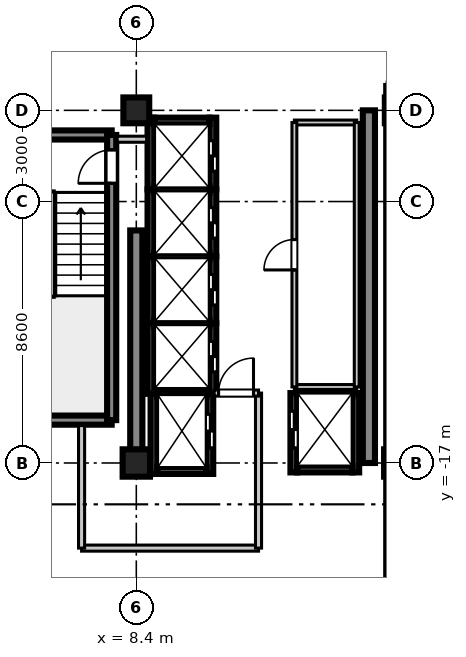
"""IFC4 building model, lengths in metres.
Left out: names, types, materials, properties, quantities, classifications, styles, units other than length and angle.
Written with IfcOpenShell. Run it as: python <this file> out.ifc"""

import sys

from ifc_helpers import new_model, si_unit, direction, frame, frame_2d, origin, origin_2d, place, context, subcontext, project, spatial, rectangle, extrude, source, transform, mapped, element, fill, save


model = new_model("IFC4")
c1 = context("Model", 3, precision=1e-05, world=origin(), true_north=direction((0.0, 1.0)))
c2 = subcontext(c1, "Body", "Model", "MODEL_VIEW")
j1 = project(units=[si_unit("LENGTHUNIT", "METRE"), si_unit("PLANEANGLEUNIT", "RADIAN")], contexts=[c1])
p1 = place(None, origin())
s1 = spatial("IfcSite", under=j1, at=p1, CompositionType="ELEMENT")
p2 = place(p1, origin())
s2 = spatial("IfcBuilding", under=s1, at=p2, CompositionType="ELEMENT")
p3 = place(p2, frame((0.0, 0.0, 273.8)))
s3 = spatial("IfcBuildingStorey", under=s2, at=p3, CompositionType="ELEMENT", Elevation=273.8)
m1 = source(origin(), c2, "Body", "SweptSolid", [
    extrude(rectangle(XDim=0.9, YDim=0.9, at=origin_2d()), origin(), (0.0, 0.0, 1.0), 3.705),
])
p4 = place(p3, frame((8.4, -17.0, 0.0), z_axis=(0.0, 0.0, 1.0), x_axis=(1.0, 0.0, 0.0)))
e1 = element("IfcColumn", 1, at=p4, inside=s3, PredefinedType="COLUMN", context=c2, shape_type="MappedRepresentation", body=[
    mapped(m1, transform((0.0, 0.0, 0.0), scale=1.0)),
])
m2 = source(origin(), c2, "Body", "SweptSolid", [
    extrude(rectangle(XDim=0.85, YDim=0.85, at=origin_2d()), origin(), (0.0, 0.0, 1.0), 3.705),
])
p5 = place(p3, frame((8.4, -5.4, 0.0), z_axis=(0.0, 0.0, 1.0), x_axis=(1.0, 0.0, 0.0)))
e2 = element("IfcColumn", 2, at=p5, inside=s3, PredefinedType="PILASTER", context=c2, shape_type="MappedRepresentation", body=[
    mapped(m2, transform((0.0, 0.0, 0.0), scale=1.0)),
])
p6 = place(p3, frame((17.0, -17.0, 0.0), z_axis=(0.0, 0.0, 1.0), x_axis=(1.0, 0.0, 0.0)))
e3 = element("IfcColumn", 3, at=p6, inside=s3, PredefinedType="COLUMN", context=c2, shape_type="MappedRepresentation", body=[
    mapped(m1, transform((0.0, 0.0, 0.0), scale=1.0)),
])
p7 = place(p3, frame((17.0, -5.4, 0.0), z_axis=(0.0, 0.0, 1.0), x_axis=(1.0, 0.0, 0.0)))
e4 = element("IfcColumn", 4, at=p7, inside=s3, PredefinedType="PILASTER", context=c2, shape_type="MappedRepresentation", body=[
    mapped(m2, transform((0.0, 0.0, 0.0), scale=1.0)),
])
m3 = source(origin(), c2, "Body", "SweptSolid", [
    extrude(rectangle(XDim=7.65, YDim=0.4, at=frame_2d((3.825, 0.0))), origin(), (0.0, 0.0, 1.0), 3.45),
])
p8 = place(p3, frame((8.4, -17.0, 0.0), z_axis=(0.0, 0.0, 1.0), x_axis=(0.0, 1.0, 0.0)))
e5 = element("IfcWall", 5, at=p8, inside=s3, PredefinedType="SHEAR", context=c2, shape_type="MappedRepresentation", body=[
    mapped(m3, transform((0.0, 0.0, 0.0), scale=1.0)),
])
m4 = source(origin(), c2, "Body", "SweptSolid", [
    extrude(rectangle(XDim=11.6, YDim=0.4, at=frame_2d((5.8, 0.0))), origin(), (0.0, 0.0, 1.0), 3.45),
])
p9 = place(p3, frame((16.05, -17.0, 0.0), z_axis=(0.0, 0.0, 1.0), x_axis=(0.0, 1.0, 0.0)))
e6 = element("IfcWall", 6, at=p9, inside=s3, PredefinedType="SHEAR", context=c2, shape_type="MappedRepresentation", body=[
    mapped(m4, transform((0.0, 0.0, 0.0), scale=1.0)),
])
m5 = source(origin(), c2, "Body", "SweptSolid", [
    extrude(rectangle(XDim=3.98, YDim=0.3, at=frame_2d((1.99, 0.0))), origin(), (0.0, 0.0, 1.0), 3.45),
])
for number, where, z_axis, x_axis in (
    (7, (3.61, -15.59, 0.0), (0.0, 0.0, 1.0), (1.0, 0.0, 0.0)),
    (8, (3.61, -6.21, 0.0), (0.0, 0.0, 1.0), (1.0, 0.0, 0.0)),
):
    element("IfcWall", number, at=place(p3, frame(where, z_axis=z_axis, x_axis=x_axis)), inside=s3, PredefinedType="SHEAR", context=c2, shape_type="MappedRepresentation", body=[
        mapped(m5, transform((0.0, 0.0, 0.0), scale=1.0)),
    ])
m6 = source(origin(), c2, "Body", "SweptSolid", [
    extrude(rectangle(XDim=9.38, YDim=0.3, at=frame_2d((4.69, 0.0))), origin(), (0.0, 0.0, 1.0), 3.45),
])
p10 = place(p3, frame((7.59, -15.59, 0.0), z_axis=(0.0, 0.0, 1.0), x_axis=(0.0, 1.0, 0.0)))
e9 = element("IfcWall", 9, at=p10, inside=s3, PredefinedType="SHEAR", context=c2, shape_type="MappedRepresentation", body=[
    mapped(m6, transform((0.0, 0.0, 0.0), scale=1.0)),
])
p11 = place(p10, frame((7.79, 0.0, 0.0)))
e10 = element("IfcOpeningElement", 10, at=p11, cuts=e9, PredefinedType="OPENING", context=c2, shape_type="SweptSolid", body=[
    extrude(rectangle(XDim=1.1, YDim=2.15, at=frame_2d((0.55, 1.075))), frame((0.0, 0.16, 0.0), z_axis=(0.0, -1.0, 0.0), x_axis=(1.0, 0.0, 0.0)), (0.0, 0.0, 1.0), 0.32),
])
m7 = source(origin(), c2, "Body", "SweptSolid", [
    extrude(rectangle(XDim=2.36, YDim=0.22, at=frame_2d((1.18, 0.0))), origin(), (0.0, 0.0, 1.0), 3.45),
])
p12 = place(p3, frame((8.88, -8.0, 0.0), z_axis=(0.0, 0.0, 1.0), x_axis=(0.0, 1.0, 0.0)))
e11 = element("IfcWall", 11, at=p12, inside=s3, PredefinedType="SHEAR", context=c2, shape_type="MappedRepresentation", body=[
    mapped(m7, transform((0.0, 0.0, 0.0), scale=1.0)),
])
p13 = place(p3, frame((10.92, -8.0, 0.0), z_axis=(0.0, 0.0, 1.0), x_axis=(0.0, 1.0, 0.0)))
e12 = element("IfcWall", 12, at=p13, inside=s3, PredefinedType="SHEAR", context=c2, shape_type="MappedRepresentation", body=[
    mapped(m7, transform((0.0, 0.0, 0.0), scale=1.0)),
])
p14 = place(p13, frame((0.6, 0.0, 0.0)))
e13 = element("IfcOpeningElement", 13, at=p14, cuts=e12, PredefinedType="OPENING", context=c2, shape_type="SweptSolid", body=[
    extrude(rectangle(XDim=1.0, YDim=2.2, at=frame_2d((0.5, 1.1))), frame((0.0, 0.12, 0.0), z_axis=(0.0, -1.0, 0.0), x_axis=(1.0, 0.0, 0.0)), (0.0, 0.0, 1.0), 0.24),
])
m8 = source(origin(), c2, "Body", "SweptSolid", [
    extrude(rectangle(XDim=1.82, YDim=0.22, at=frame_2d((0.91, 0.0))), origin(), (0.0, 0.0, 1.0), 3.45),
])
p15 = place(p3, frame((8.99, -5.75, 0.0), z_axis=(0.0, 0.0, 1.0), x_axis=(1.0, 0.0, 0.0)))
e14 = element("IfcWall", 14, at=p15, inside=s3, PredefinedType="SHEAR", context=c2, shape_type="MappedRepresentation", body=[
    mapped(m8, transform((0.0, 0.0, 0.0), scale=1.0)),
])
m9 = source(origin(), c2, "Body", "SweptSolid", [
    extrude(rectangle(XDim=2.2, YDim=0.22, at=frame_2d((1.1, 0.0))), origin(), (0.0, 0.0, 1.0), 3.45),
])
p16 = place(p3, frame((8.88, -10.2, 0.0), z_axis=(0.0, 0.0, 1.0), x_axis=(0.0, 1.0, 0.0)))
e15 = element("IfcWall", 15, at=p16, inside=s3, PredefinedType="SHEAR", context=c2, shape_type="MappedRepresentation", body=[
    mapped(m9, transform((0.0, 0.0, 0.0), scale=1.0)),
])
p17 = place(p3, frame((10.92, -10.2, 0.0), z_axis=(0.0, 0.0, 1.0), x_axis=(0.0, 1.0, 0.0)))
e16 = element("IfcWall", 16, at=p17, inside=s3, PredefinedType="SHEAR", context=c2, shape_type="MappedRepresentation", body=[
    mapped(m9, transform((0.0, 0.0, 0.0), scale=1.0)),
])
p18 = place(p17, frame((0.6, 0.0, 0.0)))
e17 = element("IfcOpeningElement", 17, at=p18, cuts=e16, PredefinedType="OPENING", context=c2, shape_type="SweptSolid", body=[
    extrude(rectangle(XDim=1.0, YDim=2.2, at=frame_2d((0.5, 1.1))), frame((0.0, 0.12, 0.0), z_axis=(0.0, -1.0, 0.0), x_axis=(1.0, 0.0, 0.0)), (0.0, 0.0, 1.0), 0.24),
])
m10 = source(origin(), c2, "Body", "SweptSolid", [
    extrude(rectangle(XDim=1.82, YDim=0.22, at=frame_2d((0.91, 0.0))), origin(), (0.0, 0.0, 1.0), 3.75),
])
p19 = place(p3, frame((8.99, -8.0, 0.0), z_axis=(0.0, 0.0, 1.0), x_axis=(1.0, 0.0, 0.0)))
e18 = element("IfcWall", 18, at=p19, inside=s3, PredefinedType="SHEAR", context=c2, shape_type="MappedRepresentation", body=[
    mapped(m10, transform((0.0, 0.0, 0.0), scale=1.0)),
])
p20 = place(p3, frame((8.88, -12.4, 0.0), z_axis=(0.0, 0.0, 1.0), x_axis=(0.0, 1.0, 0.0)))
e19 = element("IfcWall", 19, at=p20, inside=s3, PredefinedType="SHEAR", context=c2, shape_type="MappedRepresentation", body=[
    mapped(m9, transform((0.0, 0.0, 0.0), scale=1.0)),
])
p21 = place(p3, frame((10.92, -12.4, 0.0), z_axis=(0.0, 0.0, 1.0), x_axis=(0.0, 1.0, 0.0)))
e20 = element("IfcWall", 20, at=p21, inside=s3, PredefinedType="SHEAR", context=c2, shape_type="MappedRepresentation", body=[
    mapped(m9, transform((0.0, 0.0, 0.0), scale=1.0)),
])
p22 = place(p21, frame((0.6, 0.0, 0.0)))
e21 = element("IfcOpeningElement", 21, at=p22, cuts=e20, PredefinedType="OPENING", context=c2, shape_type="SweptSolid", body=[
    extrude(rectangle(XDim=1.0, YDim=2.2, at=frame_2d((0.5, 1.1))), frame((0.0, 0.12, 0.0), z_axis=(0.0, -1.0, 0.0), x_axis=(1.0, 0.0, 0.0)), (0.0, 0.0, 1.0), 0.24),
])
p23 = place(p3, frame((8.99, -10.2, 0.0), z_axis=(0.0, 0.0, 1.0), x_axis=(1.0, 0.0, 0.0)))
e22 = element("IfcWall", 22, at=p23, inside=s3, PredefinedType="SHEAR", context=c2, shape_type="MappedRepresentation", body=[
    mapped(m10, transform((0.0, 0.0, 0.0), scale=1.0)),
])
m11 = source(origin(), c2, "Body", "SweptSolid", [
    extrude(rectangle(XDim=2.325, YDim=0.22, at=frame_2d((1.163, 0.0))), origin(), (0.0, 0.0, 1.0), 3.45),
])
p24 = place(p3, frame((8.88, -14.725, 0.0), z_axis=(0.0, 0.0, 1.0), x_axis=(0.0, 1.0, 0.0)))
e23 = element("IfcWall", 23, at=p24, inside=s3, PredefinedType="SHEAR", context=c2, shape_type="MappedRepresentation", body=[
    mapped(m11, transform((0.0, 0.0, 0.0), scale=1.0)),
])
p25 = place(p3, frame((10.92, -14.725, 0.0), z_axis=(0.0, 0.0, 1.0), x_axis=(0.0, 1.0, 0.0)))
e24 = element("IfcWall", 24, at=p25, inside=s3, PredefinedType="SHEAR", context=c2, shape_type="MappedRepresentation", body=[
    mapped(m11, transform((0.0, 0.0, 0.0), scale=1.0)),
])
p26 = place(p25, frame((0.725, 0.0, 0.0)))
e25 = element("IfcOpeningElement", 25, at=p26, cuts=e24, PredefinedType="OPENING", context=c2, shape_type="SweptSolid", body=[
    extrude(rectangle(XDim=1.0, YDim=2.2, at=frame_2d((0.5, 1.1))), frame((0.0, 0.12, 0.0), z_axis=(0.0, -1.0, 0.0), x_axis=(1.0, 0.0, 0.0)), (0.0, 0.0, 1.0), 0.24),
])
p27 = place(p3, frame((8.99, -12.4, 0.0), z_axis=(0.0, 0.0, 1.0), x_axis=(1.0, 0.0, 0.0)))
e26 = element("IfcWall", 26, at=p27, inside=s3, PredefinedType="SHEAR", context=c2, shape_type="MappedRepresentation", body=[
    mapped(m10, transform((0.0, 0.0, 0.0), scale=1.0)),
])
m12 = source(origin(), c2, "Body", "SweptSolid", [
    extrude(rectangle(XDim=2.635, YDim=0.22, at=frame_2d((1.317, 0.0))), origin(), (0.0, 0.0, 1.0), 3.45),
])
p28 = place(p3, frame((8.98, -17.36, 0.0), z_axis=(0.0, 0.0, 1.0), x_axis=(0.0, 1.0, 0.0)))
e27 = element("IfcWall", 27, at=p28, inside=s3, PredefinedType="SHEAR", context=c2, shape_type="MappedRepresentation", body=[
    mapped(m12, transform((0.0, 0.0, 0.0), scale=1.0)),
])
p29 = place(p3, frame((10.82, -17.36, 0.0), z_axis=(0.0, 0.0, 1.0), x_axis=(0.0, 1.0, 0.0)))
e28 = element("IfcWall", 28, at=p29, inside=s3, PredefinedType="SHEAR", context=c2, shape_type="MappedRepresentation", body=[
    mapped(m12, transform((0.0, 0.0, 0.0), scale=1.0)),
])
p30 = place(p29, frame((0.86, 0.0, 0.0)))
e29 = element("IfcOpeningElement", 29, at=p30, cuts=e28, PredefinedType="OPENING", context=c2, shape_type="SweptSolid", body=[
    extrude(rectangle(XDim=1.1, YDim=2.2, at=frame_2d((0.55, 1.1))), frame((0.0, 0.12, 0.0), z_axis=(0.0, -1.0, 0.0), x_axis=(1.0, 0.0, 0.0)), (0.0, 0.0, 1.0), 0.24),
])
m13 = source(origin(), c2, "Body", "SweptSolid", [
    extrude(rectangle(XDim=1.62, YDim=0.22, at=frame_2d((0.81, 0.0))), origin(), (0.0, 0.0, 1.0), 3.45),
])
p31 = place(p3, frame((9.09, -17.25, 0.0), z_axis=(0.0, 0.0, 1.0), x_axis=(1.0, 0.0, 0.0)))
e30 = element("IfcWall", 30, at=p31, inside=s3, PredefinedType="SHEAR", context=c2, shape_type="MappedRepresentation", body=[
    mapped(m13, transform((0.0, 0.0, 0.0), scale=1.0)),
])
m14 = source(origin(), c2, "Body", "SweptSolid", [
    extrude(rectangle(XDim=1.62, YDim=0.22, at=frame_2d((0.81, 0.0))), origin(), (0.0, 0.0, 1.0), 3.75),
])
p32 = place(p3, frame((9.09, -14.725, 0.0), z_axis=(0.0, 0.0, 1.0), x_axis=(1.0, 0.0, 0.0)))
e31 = element("IfcWall", 31, at=p32, inside=s3, PredefinedType="SHEAR", context=c2, shape_type="MappedRepresentation", body=[
    mapped(m14, transform((0.0, 0.0, 0.0), scale=1.0)),
])
m15 = source(origin(), c2, "Body", "SweptSolid", [
    extrude(rectangle(XDim=2.61, YDim=0.22, at=frame_2d((1.305, 0.0))), origin(), (0.0, 0.0, 1.0), 3.45),
])
p33 = place(p3, frame((13.58, -17.31, 0.0), z_axis=(0.0, 0.0, 1.0), x_axis=(0.0, 1.0, 0.0)))
e32 = element("IfcWall", 32, at=p33, inside=s3, PredefinedType="SHEAR", context=c2, shape_type="MappedRepresentation", body=[
    mapped(m15, transform((0.0, 0.0, 0.0), scale=1.0)),
])
p34 = place(p33, frame((0.81, 0.0, 0.0)))
e33 = element("IfcOpeningElement", 33, at=p34, cuts=e32, PredefinedType="OPENING", context=c2, shape_type="SweptSolid", body=[
    extrude(rectangle(XDim=1.2, YDim=2.2, at=frame_2d((0.6, 1.1))), frame((0.0, 0.12, 0.0), z_axis=(0.0, -1.0, 0.0), x_axis=(1.0, 0.0, 0.0)), (0.0, 0.0, 1.0), 0.24),
])
p35 = place(p3, frame((15.62, -17.31, 0.0), z_axis=(0.0, 0.0, 1.0), x_axis=(0.0, 1.0, 0.0)))
e34 = element("IfcWall", 34, at=p35, inside=s3, PredefinedType="SHEAR", context=c2, shape_type="MappedRepresentation", body=[
    mapped(m15, transform((0.0, 0.0, 0.0), scale=1.0)),
])
p36 = place(p3, frame((13.69, -17.2, 0.0), z_axis=(0.0, 0.0, 1.0), x_axis=(1.0, 0.0, 0.0)))
e35 = element("IfcWall", 35, at=p36, inside=s3, PredefinedType="SHEAR", context=c2, shape_type="MappedRepresentation", body=[
    mapped(m8, transform((0.0, 0.0, 0.0), scale=1.0)),
])
p37 = place(p3, frame((13.69, -14.7, 0.0), z_axis=(0.0, 0.0, 1.0), x_axis=(1.0, 0.0, 0.0)))
e36 = element("IfcWall", 36, at=p37, inside=s3, PredefinedType="SHEAR", context=c2, shape_type="MappedRepresentation", body=[
    mapped(m10, transform((0.0, 0.0, 0.0), scale=1.0)),
])
m16 = source(origin(), c2, "Body", "SweptSolid", [
    extrude(rectangle(XDim=5.82, YDim=0.2, at=frame_2d((2.91, 0.0))), origin(), (0.0, 0.0, 1.0), 2.79),
])
p38 = place(p3, frame((6.6, -19.8, 0.0), z_axis=(0.0, 0.0, 1.0), x_axis=(1.0, 0.0, 0.0)))
e37 = element("IfcWall", 37, at=p38, inside=s3, PredefinedType="PARTITIONING", context=c2, shape_type="MappedRepresentation", body=[
    mapped(m16, transform((0.0, 0.0, 0.0), scale=1.0)),
])
m17 = source(origin(), c2, "Body", "SweptSolid", [
    extrude(rectangle(XDim=4.03, YDim=0.2, at=frame_2d((2.015, 0.0))), origin(), (0.0, 0.0, 1.0), 2.79),
])
p39 = place(p3, frame((6.6, -19.8, 0.0), z_axis=(0.0, 0.0, 1.0), x_axis=(0.0, 1.0, 0.0)))
e38 = element("IfcWall", 38, at=p39, inside=s3, PredefinedType="PARTITIONING", context=c2, shape_type="MappedRepresentation", body=[
    mapped(m17, transform((0.0, 0.0, 0.0), scale=1.0)),
])
m18 = source(origin(), c2, "Body", "SweptSolid", [
    extrude(rectangle(XDim=5.1, YDim=0.2, at=frame_2d((2.55, 0.0))), origin(), (0.0, 0.0, 1.0), 2.79),
])
p40 = place(p3, frame((12.42, -19.8, 0.0), z_axis=(0.0, 0.0, 1.0), x_axis=(0.0, 1.0, 0.0)))
e39 = element("IfcWall", 39, at=p40, inside=s3, PredefinedType="PARTITIONING", context=c2, shape_type="MappedRepresentation", body=[
    mapped(m18, transform((0.0, 0.0, 0.0), scale=1.0)),
])
m19 = source(origin(), c2, "Body", "SweptSolid", [
    extrude(rectangle(XDim=1.46, YDim=0.2, at=frame_2d((0.73, 0.0))), origin(), (0.0, 0.0, 1.0), 2.79),
])
p41 = place(p3, frame((10.96, -14.7, 0.0), z_axis=(0.0, 0.0, 1.0), x_axis=(1.0, 0.0, 0.0)))
e40 = element("IfcWall", 40, at=p41, inside=s3, PredefinedType="PARTITIONING", context=c2, shape_type="MappedRepresentation", body=[
    mapped(m19, transform((0.0, 0.0, 0.0), scale=1.0)),
])
p42 = place(p41, frame((0.145, 0.0, 0.0)))
e41 = element("IfcOpeningElement", 41, at=p42, cuts=e40, PredefinedType="OPENING", context=c2, shape_type="SweptSolid", body=[
    extrude(rectangle(XDim=1.15, YDim=2.15, at=frame_2d((0.575, 1.075))), frame((0.0, 0.11, 0.0), z_axis=(0.0, -1.0, 0.0), x_axis=(1.0, 0.0, 0.0)), (0.0, 0.0, 1.0), 0.22),
])
m20 = source(origin(), c2, "Body", "SweptSolid", [
    extrude(rectangle(XDim=0.97, YDim=0.2, at=frame_2d((0.485, 0.0))), origin(), (0.0, 0.0, 1.0), 2.79),
])
p43 = place(p3, frame((7.77, -6.35, 0.0), z_axis=(0.0, 0.0, 1.0), x_axis=(1.0, 0.0, 0.0)))
e42 = element("IfcWall", 42, at=p43, inside=s3, PredefinedType="PARTITIONING", context=c2, shape_type="MappedRepresentation", body=[
    mapped(m20, transform((0.0, 0.0, 0.0), scale=1.0)),
])
m21 = source(origin(), c2, "Body", "SweptSolid", [
    extrude(rectangle(XDim=2.05, YDim=0.16, at=frame_2d((1.025, 0.0))), origin(), (0.0, 0.0, 1.0), 2.79),
])
for number, where, z_axis, x_axis in (
    (43, (13.6, -14.5, 0.0), (0.0, 0.0, 1.0), (1.0, 0.0, 0.0)),
    (44, (13.6, -5.8, 0.0), (0.0, 0.0, 1.0), (1.0, 0.0, 0.0)),
):
    element("IfcWall", number, at=place(p3, frame(where, z_axis=z_axis, x_axis=x_axis)), inside=s3, PredefinedType="PARTITIONING", context=c2, shape_type="MappedRepresentation", body=[
        mapped(m21, transform((0.0, 0.0, 0.0), scale=1.0)),
    ])
m22 = source(origin(), c2, "Body", "SweptSolid", [
    extrude(rectangle(XDim=8.7, YDim=0.16, at=frame_2d((4.35, 0.0))), origin(), (0.0, 0.0, 1.0), 2.79),
])
p44 = place(p3, frame((13.6, -14.5, 0.0), z_axis=(0.0, 0.0, 1.0), x_axis=(0.0, 1.0, 0.0)))
e45 = element("IfcWall", 45, at=p44, inside=s3, PredefinedType="PARTITIONING", context=c2, shape_type="MappedRepresentation", body=[
    mapped(m22, transform((0.0, 0.0, 0.0), scale=1.0)),
])
p45 = place(p44, frame((3.85, 0.0, 0.0)))
e46 = element("IfcOpeningElement", 46, at=p45, cuts=e45, PredefinedType="OPENING", context=c2, shape_type="SweptSolid", body=[
    extrude(rectangle(XDim=1.0, YDim=2.1, at=frame_2d((0.5, 1.05))), frame((0.0, 0.09, 0.0), z_axis=(0.0, -1.0, 0.0), x_axis=(1.0, 0.0, 0.0)), (0.0, 0.0, 1.0), 0.18),
])
p46 = place(p3, frame((15.65, -14.5, 0.0), z_axis=(0.0, 0.0, 1.0), x_axis=(0.0, 1.0, 0.0)))
e47 = element("IfcWall", 47, at=p46, inside=s3, PredefinedType="PARTITIONING", context=c2, shape_type="MappedRepresentation", body=[
    mapped(m22, transform((0.0, 0.0, 0.0), scale=1.0)),
])
m23 = source(origin(), c2, "Body", "SweptSolid", [
    extrude(rectangle(XDim=17.95, YDim=0.16, at=frame_2d((8.975, 0.0))), origin(), (0.0, 0.0, 1.0), 2.79),
])
p47 = place(p3, frame((16.65, -22.5, 0.0), z_axis=(0.0, 0.0, 1.0), x_axis=(0.0, 1.0, 0.0)))
e48 = element("IfcWall", 48, at=p47, inside=s3, PredefinedType="PARTITIONING", context=c2, shape_type="MappedRepresentation", body=[
    mapped(m23, transform((0.0, 0.0, 0.0), scale=1.0)),
])
m24 = source(origin(), c2, "Body", "SweptSolid", [
    extrude(rectangle(XDim=1.1, YDim=2.15, at=frame_2d((0.55, 1.075))), frame((0.0, 0.025, 0.0), z_axis=(0.0, -1.0, 0.0), x_axis=(1.0, 0.0, 0.0)), (0.0, 0.0, 1.0), 0.05),
])
p48 = place(p11, origin())
e49 = element("IfcDoor", 49, at=p48, inside=s3, OperationType="SINGLE_SWING_LEFT", PredefinedType="DOOR", context=c2, shape_type="MappedRepresentation", body=[
    mapped(m24, transform((0.0, 0.0, 0.0), scale=1.0)),
])
fill(e10, e49)
m25 = source(origin(), c2, "Body", "SweptSolid", [
    extrude(rectangle(XDim=1.0, YDim=2.2, at=frame_2d((0.5, 1.1))), frame((0.0, 0.025, 0.0), z_axis=(0.0, -1.0, 0.0), x_axis=(1.0, 0.0, 0.0)), (0.0, 0.0, 1.0), 0.05),
])
p49 = place(p14, frame((1.0, 0.0, 0.0), z_axis=(0.0, 0.0, 1.0), x_axis=(-1.0, 0.0, 0.0)))
e50 = element("IfcDoor", 50, at=p49, inside=s3, OperationType="DOUBLE_DOOR_SLIDING", PredefinedType="DOOR", context=c2, shape_type="MappedRepresentation", body=[
    mapped(m25, transform((0.0, 0.0, 0.0), scale=1.0)),
])
fill(e13, e50)
p50 = place(p18, frame((1.0, 0.0, 0.0), z_axis=(0.0, 0.0, 1.0), x_axis=(-1.0, 0.0, 0.0)))
e51 = element("IfcDoor", 51, at=p50, inside=s3, OperationType="DOUBLE_DOOR_SLIDING", PredefinedType="DOOR", context=c2, shape_type="MappedRepresentation", body=[
    mapped(m25, transform((0.0, 0.0, 0.0), scale=1.0)),
])
fill(e17, e51)
p51 = place(p22, frame((1.0, 0.0, 0.0), z_axis=(0.0, 0.0, 1.0), x_axis=(-1.0, 0.0, 0.0)))
e52 = element("IfcDoor", 52, at=p51, inside=s3, OperationType="DOUBLE_DOOR_SLIDING", PredefinedType="DOOR", context=c2, shape_type="MappedRepresentation", body=[
    mapped(m25, transform((0.0, 0.0, 0.0), scale=1.0)),
])
fill(e21, e52)
p52 = place(p26, frame((1.0, 0.0, 0.0), z_axis=(0.0, 0.0, 1.0), x_axis=(-1.0, 0.0, 0.0)))
e53 = element("IfcDoor", 53, at=p52, inside=s3, OperationType="DOUBLE_DOOR_SLIDING", PredefinedType="DOOR", context=c2, shape_type="MappedRepresentation", body=[
    mapped(m25, transform((0.0, 0.0, 0.0), scale=1.0)),
])
fill(e25, e53)
m26 = source(origin(), c2, "Body", "SweptSolid", [
    extrude(rectangle(XDim=1.1, YDim=2.2, at=frame_2d((0.55, 1.1))), frame((0.0, 0.025, 0.0), z_axis=(0.0, -1.0, 0.0), x_axis=(1.0, 0.0, 0.0)), (0.0, 0.0, 1.0), 0.05),
])
p53 = place(p30, frame((1.1, 0.0, 0.0), z_axis=(0.0, 0.0, 1.0), x_axis=(-1.0, 0.0, 0.0)))
e54 = element("IfcDoor", 54, at=p53, inside=s3, OperationType="DOUBLE_DOOR_SLIDING", PredefinedType="DOOR", context=c2, shape_type="MappedRepresentation", body=[
    mapped(m26, transform((0.0, 0.0, 0.0), scale=1.0)),
])
fill(e29, e54)
m27 = source(origin(), c2, "Body", "SweptSolid", [
    extrude(rectangle(XDim=1.2, YDim=2.2, at=frame_2d((0.6, 1.1))), frame((0.0, 0.025, 0.0), z_axis=(0.0, -1.0, 0.0), x_axis=(1.0, 0.0, 0.0)), (0.0, 0.0, 1.0), 0.05),
])
p54 = place(p34, origin())
e55 = element("IfcDoor", 55, at=p54, inside=s3, OperationType="DOUBLE_DOOR_SLIDING", PredefinedType="DOOR", context=c2, shape_type="MappedRepresentation", body=[
    mapped(m27, transform((0.0, 0.0, 0.0), scale=1.0)),
])
fill(e33, e55)
m28 = source(origin(), c2, "Body", "SweptSolid", [
    extrude(rectangle(XDim=1.15, YDim=2.15, at=frame_2d((0.575, 1.075))), frame((0.0, 0.025, 0.0), z_axis=(0.0, -1.0, 0.0), x_axis=(1.0, 0.0, 0.0)), (0.0, 0.0, 1.0), 0.05),
])
p55 = place(p42, origin())
e56 = element("IfcDoor", 56, at=p55, inside=s3, OperationType="SINGLE_SWING_RIGHT", PredefinedType="DOOR", context=c2, shape_type="MappedRepresentation", body=[
    mapped(m28, transform((0.0, 0.0, 0.0), scale=1.0)),
])
fill(e41, e56)
m29 = source(origin(), c2, "Body", "SweptSolid", [
    extrude(rectangle(XDim=1.0, YDim=2.1, at=frame_2d((0.5, 1.05))), frame((0.0, 0.025, 0.0), z_axis=(0.0, -1.0, 0.0), x_axis=(1.0, 0.0, 0.0)), (0.0, 0.0, 1.0), 0.05),
])
p56 = place(p45, frame((1.0, 0.0, 0.0), z_axis=(0.0, 0.0, 1.0), x_axis=(-1.0, 0.0, 0.0)))
e57 = element("IfcDoor", 57, at=p56, inside=s3, OperationType="SINGLE_SWING_LEFT", PredefinedType="DOOR", context=c2, shape_type="MappedRepresentation", body=[
    mapped(m29, transform((0.0, 0.0, 0.0), scale=1.0)),
])
fill(e46, e57)
save(model, sys.argv[1])
